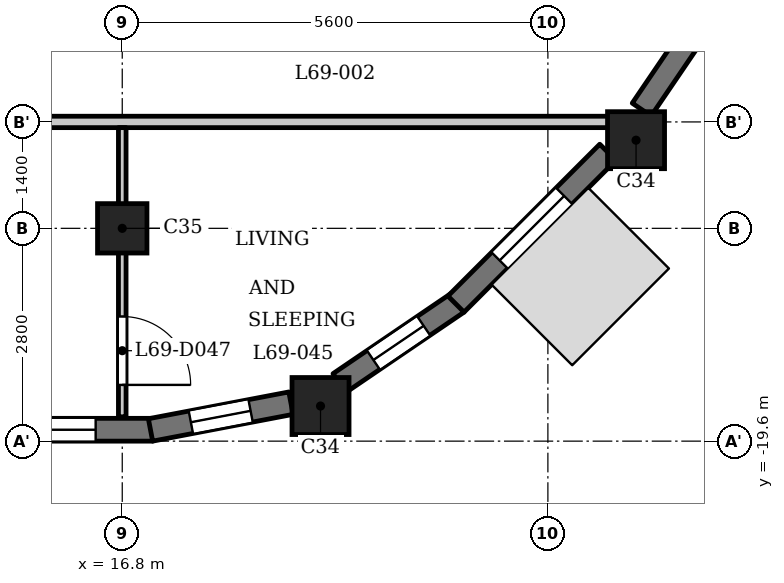
"""IFC4 building model, lengths in metres.
Left out: names, types, materials, properties, quantities, classifications, styles, units other than length and angle.
Written with IfcOpenShell. Run it as: python <this file> out.ifc"""

import sys

from ifc_helpers import new_model, si_unit, direction, frame, frame_2d, origin, origin_2d, place, context, subcontext, project, spatial, rectangle, extrude, element, fill, save


model = new_model("IFC4")
c1 = context("Model", 3, precision=1e-05, world=origin(), true_north=direction((0.0, 1.0)))
c2 = subcontext(c1, "Body", "Model", "MODEL_VIEW")
j1 = project(units=[si_unit("LENGTHUNIT", "METRE"), si_unit("PLANEANGLEUNIT", "RADIAN")], contexts=[c1])
p1 = place(None, origin())
s1 = spatial("IfcSite", under=j1, at=p1, CompositionType="ELEMENT")
p2 = place(p1, origin())
s2 = spatial("IfcBuilding", under=s1, at=p2, CompositionType="ELEMENT")
p3 = place(p2, frame((0.0, 0.0, 266.2)))
s3 = spatial("IfcBuildingStorey", under=s2, at=p3, CompositionType="ELEMENT", Elevation=266.2)
for number, where, z_axis, x_axis in (
    (1, (19.409, -19.138, 0.0), (0.0, 0.0, 1.0), (1.0, 0.0, 0.0)),
    (2, (23.56, -15.64, 0.0), (0.0, 0.0, 1.0), (1.0, 0.0, 0.0)),
):
    element("IfcColumn", number, at=place(p3, frame(where, z_axis=z_axis, x_axis=x_axis)), inside=s3, PredefinedType="COLUMN", context=c2, shape_type="SweptSolid", body=[
        extrude(rectangle(XDim=0.75, YDim=0.75, at=origin_2d()), origin(), (0.0, 0.0, 1.0), 3.5),
    ])
p4 = place(p3, frame((16.8, -16.8, 0.0), z_axis=(0.0, 0.0, 1.0), x_axis=(1.0, 0.0, 0.0)))
e3 = element("IfcColumn", 3, at=p4, inside=s3, PredefinedType="COLUMN", context=c2, shape_type="SweptSolid", body=[
    extrude(rectangle(XDim=0.65, YDim=0.65, at=origin_2d()), origin(), (0.0, 0.0, 1.0), 3.5),
])
p5 = place(p3, frame((14.375, -19.45, 0.0), z_axis=(0.0, 0.0, 1.0), x_axis=(1.0, 0.0, 0.0)))
e4 = element("IfcWall", 4, at=p5, inside=s3, PredefinedType="SOLIDWALL", context=c2, shape_type="SweptSolid", body=[
    extrude(rectangle(XDim=2.825, YDim=0.3, at=frame_2d((1.413, 0.0))), origin(), (0.0, 0.0, 1.0), 2.55),
])
p6 = place(p5, frame((0.275, 0.0, 0.9)))
e5 = element("IfcOpeningElement", 5, at=p6, cuts=e4, PredefinedType="OPENING", context=c2, shape_type="SweptSolid", body=[
    extrude(rectangle(XDim=1.8, YDim=1.25, at=frame_2d((0.9, 0.625))), frame((0.0, 0.16, 0.0), z_axis=(0.0, -1.0, 0.0), x_axis=(1.0, 0.0, 0.0)), (0.0, 0.0, 1.0), 0.32),
])
p7 = place(p3, frame((17.172, -19.453, 0.0), z_axis=(0.0, 0.0, 1.0), x_axis=(0.982284001233, 0.187398348234, 0.0)))
e6 = element("IfcWall", 6, at=p7, inside=s3, PredefinedType="SOLIDWALL", context=c2, shape_type="SweptSolid", body=[
    extrude(rectangle(XDim=1.881, YDim=0.3, at=frame_2d((0.941, 0.0))), origin(), (0.0, 0.0, 1.0), 2.55),
])
p8 = place(p7, frame((0.541, 0.0, 0.6)))
e7 = element("IfcOpeningElement", 7, at=p8, cuts=e6, PredefinedType="OPENING", context=c2, shape_type="SweptSolid", body=[
    extrude(rectangle(XDim=0.8, YDim=1.55, at=frame_2d((0.4, 0.775))), frame((0.0, 0.16, 0.0), z_axis=(0.0, -1.0, 0.0), x_axis=(1.0, 0.0, 0.0)), (0.0, 0.0, 1.0), 0.32),
])
p9 = place(p3, frame((19.657, -18.836, 0.0), z_axis=(0.0, 0.0, 1.0), x_axis=(0.82704477487, 0.562136051469, 0.0)))
e8 = element("IfcWall", 8, at=p9, inside=s3, PredefinedType="SOLIDWALL", context=c2, shape_type="SweptSolid", body=[
    extrude(rectangle(XDim=1.881, YDim=0.3, at=frame_2d((0.94, 0.0))), origin(), (0.0, 0.0, 1.0), 2.55),
])
p10 = place(p9, frame((0.541, 0.0, 0.6)))
e9 = element("IfcOpeningElement", 9, at=p10, cuts=e8, PredefinedType="OPENING", context=c2, shape_type="SweptSolid", body=[
    extrude(rectangle(XDim=0.8, YDim=1.55, at=frame_2d((0.4, 0.775))), frame((0.0, 0.16, 0.0), z_axis=(0.0, -1.0, 0.0), x_axis=(1.0, 0.0, 0.0)), (0.0, 0.0, 1.0), 0.32),
])
p11 = place(p3, frame((21.191, -17.797, 0.0), z_axis=(0.0, 0.0, 1.0), x_axis=(0.707106781187, 0.707106781187, 0.0)))
e10 = element("IfcWall", 10, at=p11, inside=s3, PredefinedType="SOLIDWALL", context=c2, shape_type="SweptSolid", body=[
    extrude(rectangle(XDim=2.825, YDim=0.3, at=frame_2d((1.413, 0.0))), origin(), (0.0, 0.0, 1.0), 2.55),
])
p12 = place(p11, frame((0.812, 0.0, 0.6)))
e11 = element("IfcOpeningElement", 11, at=p12, cuts=e10, PredefinedType="OPENING", context=c2, shape_type="SweptSolid", body=[
    extrude(rectangle(XDim=1.2, YDim=1.55, at=frame_2d((0.6, 0.775))), frame((0.0, 0.16, 0.0), z_axis=(0.0, -1.0, 0.0), x_axis=(1.0, 0.0, 0.0)), (0.0, 0.0, 1.0), 0.32),
])
p13 = place(p3, frame((23.634, -15.237, 0.0), z_axis=(0.0, 0.0, 1.0), x_axis=(0.562099454787, 0.827069648173, 0.0)))
e12 = element("IfcWall", 12, at=p13, inside=s3, PredefinedType="SOLIDWALL", context=c2, shape_type="SweptSolid", body=[
    extrude(rectangle(XDim=1.427, YDim=0.3, at=frame_2d((0.714, 0.0))), origin(), (0.0, 0.0, 1.0), 2.55),
])
p14 = place(p3, frame((-23.322, -15.4, 0.0), z_axis=(0.0, 0.0, 1.0), x_axis=(1.0, 0.0, 0.0)))
e13 = element("IfcWall", 13, at=p14, inside=s3, PredefinedType="PARTITIONING", context=c2, shape_type="SweptSolid", body=[
    extrude(rectangle(XDim=46.872, YDim=0.15, at=frame_2d((23.436, 0.0))), origin(), (0.0, 0.0, 1.0), 3.2),
])
p15 = place(p14, frame((12.772, 0.0, 0.0)))
e14 = element("IfcOpeningElement", 14, at=p15, cuts=e13, PredefinedType="OPENING", context=c2, shape_type="SweptSolid", body=[
    extrude(rectangle(XDim=1.0, YDim=2.1, at=frame_2d((0.5, 1.05))), frame((0.0, 0.085, 0.0), z_axis=(0.0, -1.0, 0.0), x_axis=(1.0, 0.0, 0.0)), (0.0, 0.0, 1.0), 0.17),
])
p16 = place(p14, frame((29.572, 0.0, 0.0)))
e15 = element("IfcOpeningElement", 15, at=p16, cuts=e13, PredefinedType="OPENING", context=c2, shape_type="SweptSolid", body=[
    extrude(rectangle(XDim=1.0, YDim=2.1, at=frame_2d((0.5, 1.05))), frame((0.0, 0.085, 0.0), z_axis=(0.0, -1.0, 0.0), x_axis=(1.0, 0.0, 0.0)), (0.0, 0.0, 1.0), 0.17),
])
p17 = place(p14, frame((37.572, 0.0, 0.0)))
e16 = element("IfcOpeningElement", 16, at=p17, cuts=e13, PredefinedType="OPENING", context=c2, shape_type="SweptSolid", body=[
    extrude(rectangle(XDim=1.0, YDim=2.1, at=frame_2d((0.5, 1.05))), frame((0.0, 0.085, 0.0), z_axis=(0.0, -1.0, 0.0), x_axis=(1.0, 0.0, 0.0)), (0.0, 0.0, 1.0), 0.17),
])
p18 = place(p3, frame((16.8, -19.28, 0.0), z_axis=(0.0, 0.0, 1.0), x_axis=(0.0, 1.0, 0.0)))
e17 = element("IfcWall", 17, at=p18, inside=s3, PredefinedType="PARTITIONING", context=c2, shape_type="SweptSolid", body=[
    extrude(rectangle(XDim=3.805, YDim=0.1, at=frame_2d((1.902, 0.0))), origin(), (0.0, 0.0, 1.0), 3.2),
])
p19 = place(p18, frame((0.42, 0.0, 0.0)))
e18 = element("IfcOpeningElement", 18, at=p19, cuts=e17, PredefinedType="OPENING", context=c2, shape_type="SweptSolid", body=[
    extrude(rectangle(XDim=0.9, YDim=2.1, at=frame_2d((0.45, 1.05))), frame((0.0, 0.06, 0.0), z_axis=(0.0, -1.0, 0.0), x_axis=(1.0, 0.0, 0.0)), (0.0, 0.0, 1.0), 0.12),
])
p20 = place(p19, origin())
e19 = element("IfcDoor", 19, at=p20, inside=s3, OperationType="SINGLE_SWING_LEFT", PredefinedType="DOOR", context=c2, shape_type="SweptSolid", body=[
    extrude(rectangle(XDim=0.9, YDim=2.1, at=frame_2d((0.45, 1.05))), frame((0.0, 0.025, 0.0), z_axis=(0.0, -1.0, 0.0), x_axis=(1.0, 0.0, 0.0)), (0.0, 0.0, 1.0), 0.05),
])
fill(e18, e19)
p21 = place(p6, origin())
e20 = element("IfcWindow", 20, at=p21, inside=s3, PartitioningType="SINGLE_PANEL", PredefinedType="WINDOW", context=c2, shape_type="SweptSolid", body=[
    extrude(rectangle(XDim=1.8, YDim=1.25, at=frame_2d((0.9, 0.625))), frame((0.0, 0.03, 0.0), z_axis=(0.0, -1.0, 0.0), x_axis=(1.0, 0.0, 0.0)), (0.0, 0.0, 1.0), 0.06),
])
fill(e5, e20)
p22 = place(p8, origin())
e21 = element("IfcWindow", 21, at=p22, inside=s3, PartitioningType="SINGLE_PANEL", PredefinedType="WINDOW", context=c2, shape_type="SweptSolid", body=[
    extrude(rectangle(XDim=0.8, YDim=1.55, at=frame_2d((0.4, 0.775))), frame((0.0, 0.03, 0.0), z_axis=(0.0, -1.0, 0.0), x_axis=(1.0, 0.0, 0.0)), (0.0, 0.0, 1.0), 0.06),
])
fill(e7, e21)
p23 = place(p10, origin())
e22 = element("IfcWindow", 22, at=p23, inside=s3, PartitioningType="SINGLE_PANEL", PredefinedType="WINDOW", context=c2, shape_type="SweptSolid", body=[
    extrude(rectangle(XDim=0.8, YDim=1.55, at=frame_2d((0.4, 0.775))), frame((0.0, 0.03, 0.0), z_axis=(0.0, -1.0, 0.0), x_axis=(1.0, 0.0, 0.0)), (0.0, 0.0, 1.0), 0.06),
])
fill(e9, e22)
p24 = place(p12, origin())
e23 = element("IfcWindow", 23, at=p24, inside=s3, PartitioningType="SINGLE_PANEL", PredefinedType="WINDOW", context=c2, shape_type="SweptSolid", body=[
    extrude(rectangle(XDim=1.2, YDim=1.55, at=frame_2d((0.6, 0.775))), frame((0.0, 0.03, 0.0), z_axis=(0.0, -1.0, 0.0), x_axis=(1.0, 0.0, 0.0)), (0.0, 0.0, 1.0), 0.06),
])
fill(e11, e23)
save(model, sys.argv[1])
